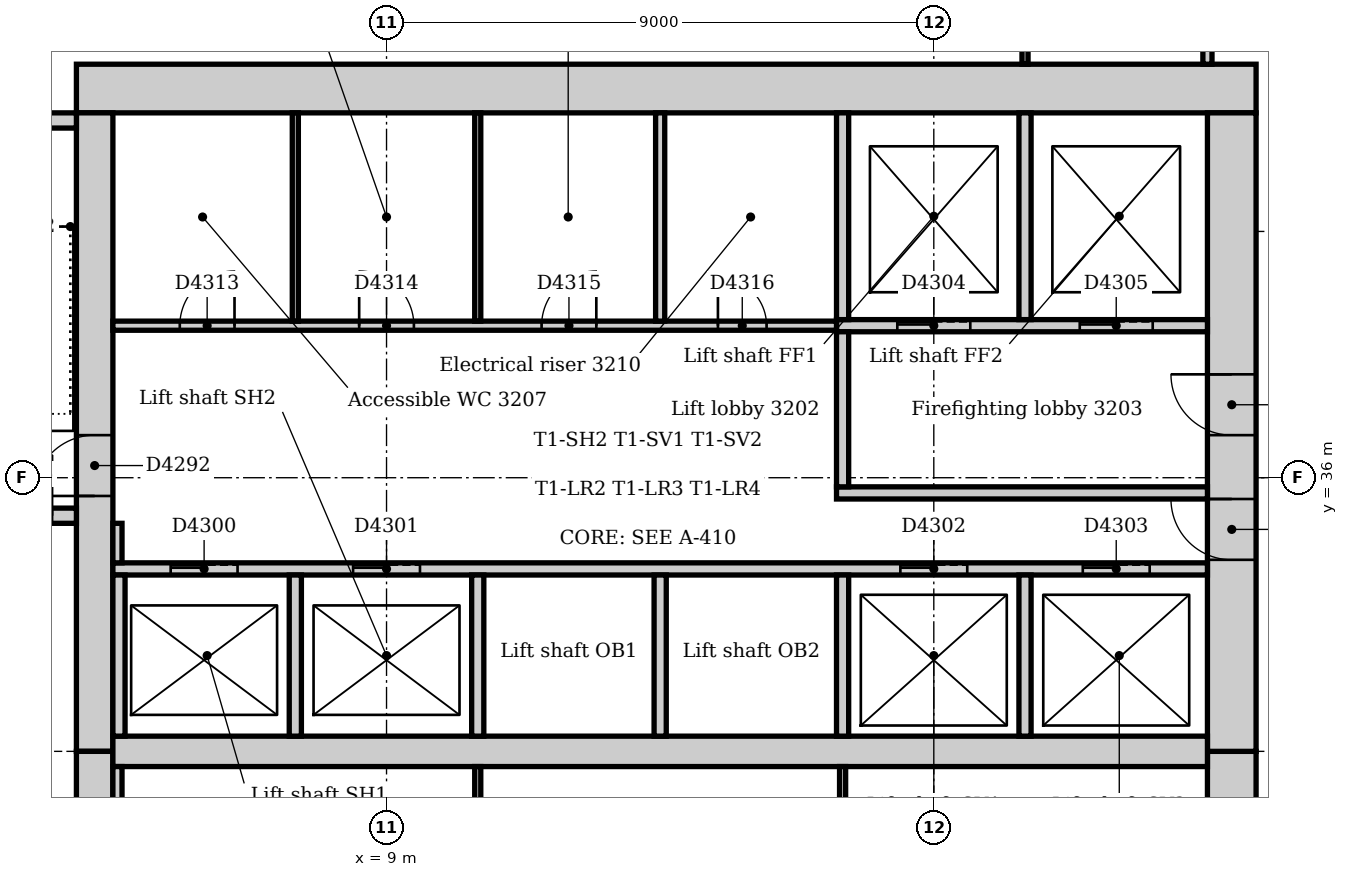
"""IFC4 building model, lengths in metres.
Left out: names, types, materials, properties, quantities, classifications, styles, units other than length and angle.
Written with IfcOpenShell. Run it as: python <this file> out.ifc"""

import sys

from ifc_helpers import new_model, si_unit, direction, frame, frame_2d, origin, place, context, subcontext, project, spatial, rectangle, extrude, element, fill, save


model = new_model("IFC4")
c1 = context("Model", 3, precision=1e-05, world=origin(), true_north=direction((0.0, 1.0)))
c2 = subcontext(c1, "Body", "Model", "MODEL_VIEW")
j1 = project(units=[si_unit("LENGTHUNIT", "METRE"), si_unit("PLANEANGLEUNIT", "RADIAN")], contexts=[c1])
p1 = place(None, origin())
s1 = spatial("IfcSite", under=j1, at=p1, CompositionType="ELEMENT")
p2 = place(p1, origin())
s2 = spatial("IfcBuilding", under=s1, at=p2, CompositionType="ELEMENT")
p3 = place(p2, frame((0.0, 0.0, 136.0)))
s3 = spatial("IfcBuildingStorey", under=s2, at=p3, CompositionType="ELEMENT", Elevation=136.0)
p4 = place(p3, frame((23.3, 42.4, 0.0), z_axis=(0.0, 0.0, 1.0), x_axis=(-1.0, 0.0, 0.0)))
e1 = element("IfcWall", 1, at=p4, inside=s3, PredefinedType="SOLIDWALL", context=c2, shape_type="SweptSolid", body=[
    extrude(rectangle(XDim=19.4, YDim=0.8, at=frame_2d((9.7, 0.0))), origin(), (0.0, 0.0, 1.0), 4.0),
])
p5 = place(p3, frame((22.9, 21.0, 0.0), z_axis=(0.0, 0.0, 1.0), x_axis=(0.0, 1.0, 0.0)))
e2 = element("IfcWall", 2, at=p5, inside=s3, PredefinedType="SOLIDWALL", context=c2, shape_type="SweptSolid", body=[
    extrude(rectangle(XDim=10.5, YDim=0.8, at=frame_2d((5.25, 0.0))), origin(), (0.0, 0.0, 1.0), 4.0),
])
p6 = place(p5, frame((4.35, 0.0, 0.0)))
e3 = element("IfcOpeningElement", 3, at=p6, cuts=e2, PredefinedType="OPENING", context=c2, shape_type="SweptSolid", body=[
    extrude(rectangle(XDim=1.8, YDim=2.1, at=frame_2d((0.9, 1.05))), frame((0.0, 0.41, 0.0), z_axis=(0.0, -1.0, 0.0), x_axis=(1.0, 0.0, 0.0)), (0.0, 0.0, 1.0), 0.82),
])
p7 = place(p3, frame((22.9, 31.5, 0.0), z_axis=(0.0, 0.0, 1.0), x_axis=(0.0, 1.0, 0.0)))
e4 = element("IfcWall", 4, at=p7, inside=s3, PredefinedType="SOLIDWALL", context=c2, shape_type="SweptSolid", body=[
    extrude(rectangle(XDim=10.5, YDim=0.8, at=frame_2d((5.25, 0.0))), origin(), (0.0, 0.0, 1.0), 4.0),
])
p8 = place(p7, frame((3.15, 0.0, 0.0)))
e5 = element("IfcOpeningElement", 5, at=p8, cuts=e4, PredefinedType="OPENING", context=c2, shape_type="SweptSolid", body=[
    extrude(rectangle(XDim=1.0, YDim=2.1, at=frame_2d((0.5, 1.05))), frame((0.0, 0.41, 0.0), z_axis=(0.0, -1.0, 0.0), x_axis=(1.0, 0.0, 0.0)), (0.0, 0.0, 1.0), 0.82),
])
p9 = place(p7, frame((5.2, 0.0, 0.0)))
e6 = element("IfcOpeningElement", 6, at=p9, cuts=e4, PredefinedType="OPENING", context=c2, shape_type="SweptSolid", body=[
    extrude(rectangle(XDim=1.0, YDim=2.1, at=frame_2d((0.5, 1.05))), frame((0.0, 0.41, 0.0), z_axis=(0.0, -1.0, 0.0), x_axis=(1.0, 0.0, 0.0)), (0.0, 0.0, 1.0), 0.82),
])
p10 = place(p3, frame((4.2, 42.0, 0.0), z_axis=(0.0, 0.0, 1.0), x_axis=(0.0, -1.0, 0.0)))
e7 = element("IfcWall", 7, at=p10, inside=s3, PredefinedType="SOLIDWALL", context=c2, shape_type="SweptSolid", body=[
    extrude(rectangle(XDim=10.5, YDim=0.6, at=frame_2d((5.25, 0.0))), origin(), (0.0, 0.0, 1.0), 4.0),
])
p11 = place(p10, frame((5.3, 0.0, 0.0)))
e8 = element("IfcOpeningElement", 8, at=p11, cuts=e7, PredefinedType="OPENING", context=c2, shape_type="SweptSolid", body=[
    extrude(rectangle(XDim=1.0, YDim=2.1, at=frame_2d((0.5, 1.05))), frame((0.0, 0.31, 0.0), z_axis=(0.0, -1.0, 0.0), x_axis=(1.0, 0.0, 0.0)), (0.0, 0.0, 1.0), 0.62),
])
p12 = place(p3, frame((4.2, 31.5, 0.0), z_axis=(0.0, 0.0, 1.0), x_axis=(0.0, -1.0, 0.0)))
e9 = element("IfcWall", 9, at=p12, inside=s3, PredefinedType="SOLIDWALL", context=c2, shape_type="SweptSolid", body=[
    extrude(rectangle(XDim=10.5, YDim=0.6, at=frame_2d((5.25, 0.0))), origin(), (0.0, 0.0, 1.0), 4.0),
])
p13 = place(p12, frame((4.25, 0.0, 0.0)))
e10 = element("IfcOpeningElement", 10, at=p13, cuts=e9, PredefinedType="OPENING", context=c2, shape_type="SweptSolid", body=[
    extrude(rectangle(XDim=1.0, YDim=2.1, at=frame_2d((0.5, 1.05))), frame((0.0, 0.31, 0.0), z_axis=(0.0, -1.0, 0.0), x_axis=(1.0, 0.0, 0.0)), (0.0, 0.0, 1.0), 0.62),
])
p14 = place(p3, frame((4.5, 31.5, 0.0), z_axis=(0.0, 0.0, 1.0), x_axis=(1.0, 0.0, 0.0)))
e11 = element("IfcWall", 11, at=p14, inside=s3, PredefinedType="SOLIDWALL", context=c2, shape_type="SweptSolid", body=[
    extrude(rectangle(XDim=18.0, YDim=0.5, at=frame_2d((9.0, 0.0))), origin(), (0.0, 0.0, 1.0), 4.0),
])
p15 = place(p3, frame((0.36, 35.375, 0.0), z_axis=(0.0, 0.0, 1.0), x_axis=(1.0, 0.0, 0.0)))
e12 = element("IfcWall", 12, at=p15, inside=s3, PredefinedType="SOLIDWALL", context=c2, shape_type="SweptSolid", body=[
    extrude(rectangle(XDim=3.54, YDim=0.25, at=frame_2d((1.77, 0.0))), origin(), (0.0, 0.0, 1.0), 4.0),
])
p16 = place(p15, frame((2.14, 0.0, 0.0)))
e13 = element("IfcOpeningElement", 13, at=p16, cuts=e12, PredefinedType="OPENING", context=c2, shape_type="SweptSolid", body=[
    extrude(rectangle(XDim=1.0, YDim=2.1, at=frame_2d((0.5, 1.05))), frame((0.0, 0.135, 0.0), z_axis=(0.0, -1.0, 0.0), x_axis=(1.0, 0.0, 0.0)), (0.0, 0.0, 1.0), 0.27),
])
p17 = place(p3, frame((3.9, 41.875, 0.0), z_axis=(0.0, 0.0, 1.0), x_axis=(-1.0, 0.0, 0.0)))
e14 = element("IfcWall", 14, at=p17, inside=s3, PredefinedType="SOLIDWALL", context=c2, shape_type="SweptSolid", body=[
    extrude(rectangle(XDim=3.54, YDim=0.25, at=frame_2d((1.77, 0.0))), origin(), (0.0, 0.0, 1.0), 4.0),
])
p18 = place(p3, frame((16.4, 35.75, 0.0), z_axis=(0.0, 0.0, 1.0), x_axis=(1.0, 0.0, 0.0)))
e15 = element("IfcWall", 15, at=p18, inside=s3, PredefinedType="PARTITIONING", context=c2, shape_type="SweptSolid", body=[
    extrude(rectangle(XDim=6.1, YDim=0.2, at=frame_2d((3.05, 0.0))), origin(), (0.0, 0.0, 1.0), 3.85),
])
p19 = place(p3, frame((16.4, 38.5, 0.0), z_axis=(0.0, 0.0, 1.0), x_axis=(1.0, 0.0, 0.0)))
e16 = element("IfcWall", 16, at=p19, inside=s3, PredefinedType="PARTITIONING", context=c2, shape_type="SweptSolid", body=[
    extrude(rectangle(XDim=6.1, YDim=0.2, at=frame_2d((3.05, 0.0))), origin(), (0.0, 0.0, 1.0), 3.85),
])
p20 = place(p19, frame((1.0, 0.0, 0.0)))
e17 = element("IfcOpeningElement", 17, at=p20, cuts=e16, PredefinedType="OPENING", context=c2, shape_type="SweptSolid", body=[
    extrude(rectangle(XDim=1.2, YDim=2.1, at=frame_2d((0.6, 1.05))), frame((0.0, 0.11, 0.0), z_axis=(0.0, -1.0, 0.0), x_axis=(1.0, 0.0, 0.0)), (0.0, 0.0, 1.0), 0.22),
])
p21 = place(p19, frame((4.0, 0.0, 0.0)))
e18 = element("IfcOpeningElement", 18, at=p21, cuts=e16, PredefinedType="OPENING", context=c2, shape_type="SweptSolid", body=[
    extrude(rectangle(XDim=1.2, YDim=2.1, at=frame_2d((0.6, 1.05))), frame((0.0, 0.11, 0.0), z_axis=(0.0, -1.0, 0.0), x_axis=(1.0, 0.0, 0.0)), (0.0, 0.0, 1.0), 0.22),
])
p22 = place(p3, frame((16.5, 35.85, 0.0), z_axis=(0.0, 0.0, 1.0), x_axis=(0.0, 1.0, 0.0)))
e19 = element("IfcWall", 19, at=p22, inside=s3, PredefinedType="PARTITIONING", context=c2, shape_type="SweptSolid", body=[
    extrude(rectangle(XDim=2.55, YDim=0.2, at=frame_2d((1.275, 0.0))), origin(), (0.0, 0.0, 1.0), 3.85),
])
p23 = place(p3, frame((4.5, 34.5, 0.0), z_axis=(0.0, 0.0, 1.0), x_axis=(1.0, 0.0, 0.0)))
e20 = element("IfcWall", 20, at=p23, inside=s3, PredefinedType="PARTITIONING", context=c2, shape_type="SweptSolid", body=[
    extrude(rectangle(XDim=18.0, YDim=0.2, at=frame_2d((9.0, 0.0))), origin(), (0.0, 0.0, 1.0), 3.85),
])
p24 = place(p23, frame((0.95, 0.0, 0.0)))
e21 = element("IfcOpeningElement", 21, at=p24, cuts=e20, PredefinedType="OPENING", context=c2, shape_type="SweptSolid", body=[
    extrude(rectangle(XDim=1.1, YDim=2.1, at=frame_2d((0.55, 1.05))), frame((0.0, 0.11, 0.0), z_axis=(0.0, -1.0, 0.0), x_axis=(1.0, 0.0, 0.0)), (0.0, 0.0, 1.0), 0.22),
])
p25 = place(p23, frame((3.95, 0.0, 0.0)))
e22 = element("IfcOpeningElement", 22, at=p25, cuts=e20, PredefinedType="OPENING", context=c2, shape_type="SweptSolid", body=[
    extrude(rectangle(XDim=1.1, YDim=2.1, at=frame_2d((0.55, 1.05))), frame((0.0, 0.11, 0.0), z_axis=(0.0, -1.0, 0.0), x_axis=(1.0, 0.0, 0.0)), (0.0, 0.0, 1.0), 0.22),
])
p26 = place(p23, frame((12.95, 0.0, 0.0)))
e23 = element("IfcOpeningElement", 23, at=p26, cuts=e20, PredefinedType="OPENING", context=c2, shape_type="SweptSolid", body=[
    extrude(rectangle(XDim=1.1, YDim=2.1, at=frame_2d((0.55, 1.05))), frame((0.0, 0.11, 0.0), z_axis=(0.0, -1.0, 0.0), x_axis=(1.0, 0.0, 0.0)), (0.0, 0.0, 1.0), 0.22),
])
p27 = place(p23, frame((15.95, 0.0, 0.0)))
e24 = element("IfcOpeningElement", 24, at=p27, cuts=e20, PredefinedType="OPENING", context=c2, shape_type="SweptSolid", body=[
    extrude(rectangle(XDim=1.1, YDim=2.1, at=frame_2d((0.55, 1.05))), frame((0.0, 0.11, 0.0), z_axis=(0.0, -1.0, 0.0), x_axis=(1.0, 0.0, 0.0)), (0.0, 0.0, 1.0), 0.22),
])
for number, where, z_axis, x_axis in (
    (25, (16.5, 38.6, 0.0), (0.0, 0.0, 1.0), (0.0, 1.0, 0.0)),
    (26, (19.5, 38.6, 0.0), (0.0, 0.0, 1.0), (0.0, 1.0, 0.0)),
):
    element("IfcWall", number, at=place(p3, frame(where, z_axis=z_axis, x_axis=x_axis)), inside=s3, PredefinedType="PARTITIONING", context=c2, shape_type="SweptSolid", body=[
        extrude(rectangle(XDim=3.4, YDim=0.2, at=frame_2d((1.7, 0.0))), origin(), (0.0, 0.0, 1.0), 3.85),
    ])
for number, where, z_axis, x_axis in (
    (27, (4.6, 31.75, 0.0), (0.0, 0.0, 1.0), (0.0, 1.0, 0.0)),
    (28, (7.5, 31.75, 0.0), (0.0, 0.0, 1.0), (0.0, 1.0, 0.0)),
    (29, (10.5, 31.75, 0.0), (0.0, 0.0, 1.0), (0.0, 1.0, 0.0)),
    (30, (13.5, 31.75, 0.0), (0.0, 0.0, 1.0), (0.0, 1.0, 0.0)),
    (31, (16.5, 31.75, 0.0), (0.0, 0.0, 1.0), (0.0, 1.0, 0.0)),
    (32, (19.5, 31.75, 0.0), (0.0, 0.0, 1.0), (0.0, 1.0, 0.0)),
):
    element("IfcWall", number, at=place(p3, frame(where, z_axis=z_axis, x_axis=x_axis)), inside=s3, PredefinedType="PARTITIONING", context=c2, shape_type="SweptSolid", body=[
        extrude(rectangle(XDim=2.65, YDim=0.2, at=frame_2d((1.325, 0.0))), origin(), (0.0, 0.0, 1.0), 3.85),
    ])
p28 = place(p3, frame((4.5, 38.5, 0.0), z_axis=(0.0, 0.0, 1.0), x_axis=(1.0, 0.0, 0.0)))
e33 = element("IfcWall", 33, at=p28, inside=s3, PredefinedType="PARTITIONING", context=c2, shape_type="SweptSolid", body=[
    extrude(rectangle(XDim=11.9, YDim=0.15, at=frame_2d((5.95, 0.0))), origin(), (0.0, 0.0, 1.0), 3.85),
])
p29 = place(p28, frame((1.1, 0.0, 0.0)))
e34 = element("IfcOpeningElement", 34, at=p29, cuts=e33, PredefinedType="OPENING", context=c2, shape_type="SweptSolid", body=[
    extrude(rectangle(XDim=0.9, YDim=2.1, at=frame_2d((0.45, 1.05))), frame((0.0, 0.085, 0.0), z_axis=(0.0, -1.0, 0.0), x_axis=(1.0, 0.0, 0.0)), (0.0, 0.0, 1.0), 0.17),
])
p30 = place(p28, frame((4.05, 0.0, 0.0)))
e35 = element("IfcOpeningElement", 35, at=p30, cuts=e33, PredefinedType="OPENING", context=c2, shape_type="SweptSolid", body=[
    extrude(rectangle(XDim=0.9, YDim=2.1, at=frame_2d((0.45, 1.05))), frame((0.0, 0.085, 0.0), z_axis=(0.0, -1.0, 0.0), x_axis=(1.0, 0.0, 0.0)), (0.0, 0.0, 1.0), 0.17),
])
p31 = place(p28, frame((7.05, 0.0, 0.0)))
e36 = element("IfcOpeningElement", 36, at=p31, cuts=e33, PredefinedType="OPENING", context=c2, shape_type="SweptSolid", body=[
    extrude(rectangle(XDim=0.9, YDim=2.1, at=frame_2d((0.45, 1.05))), frame((0.0, 0.085, 0.0), z_axis=(0.0, -1.0, 0.0), x_axis=(1.0, 0.0, 0.0)), (0.0, 0.0, 1.0), 0.17),
])
p32 = place(p28, frame((9.95, 0.0, 0.0)))
e37 = element("IfcOpeningElement", 37, at=p32, cuts=e33, PredefinedType="OPENING", context=c2, shape_type="SweptSolid", body=[
    extrude(rectangle(XDim=0.8, YDim=2.1, at=frame_2d((0.4, 1.05))), frame((0.0, 0.085, 0.0), z_axis=(0.0, -1.0, 0.0), x_axis=(1.0, 0.0, 0.0)), (0.0, 0.0, 1.0), 0.17),
])
p33 = place(p3, frame((22.5, 42.8, 0.0), z_axis=(0.0, 0.0, 1.0), x_axis=(0.0, 1.0, 0.0)))
e38 = element("IfcWall", 38, at=p33, inside=s3, PredefinedType="PARTITIONING", context=c2, shape_type="SweptSolid", body=[
    extrude(rectangle(XDim=6.34, YDim=0.15, at=frame_2d((3.17, 0.0))), origin(), (0.0, 0.0, 1.0), 3.85),
])
p34 = place(p33, frame((3.7, 0.0, 0.0)))
e39 = element("IfcOpeningElement", 39, at=p34, cuts=e38, PredefinedType="OPENING", context=c2, shape_type="SweptSolid", body=[
    extrude(rectangle(XDim=1.0, YDim=2.1, at=frame_2d((0.5, 1.05))), frame((0.0, 0.085, 0.0), z_axis=(0.0, -1.0, 0.0), x_axis=(1.0, 0.0, 0.0)), (0.0, 0.0, 1.0), 0.17),
])
p35 = place(p3, frame((4.575, 28.575, 0.0), z_axis=(0.0, 0.0, 1.0), x_axis=(0.0, 1.0, 0.0)))
e40 = element("IfcWall", 40, at=p35, inside=s3, PredefinedType="PARTITIONING", context=c2, shape_type="SweptSolid", body=[
    extrude(rectangle(XDim=2.675, YDim=0.15, at=frame_2d((1.337, 0.0))), origin(), (0.0, 0.0, 1.0), 3.85),
])
p36 = place(p3, frame((4.575, 34.6, 0.0), z_axis=(0.0, 0.0, 1.0), x_axis=(0.0, 1.0, 0.0)))
e41 = element("IfcWall", 41, at=p36, inside=s3, PredefinedType="PARTITIONING", context=c2, shape_type="SweptSolid", body=[
    extrude(rectangle(XDim=0.65, YDim=0.15, at=frame_2d((0.325, 0.0))), origin(), (0.0, 0.0, 1.0), 3.85),
])
p37 = place(p3, frame((13.5, 38.575, 0.0), z_axis=(0.0, 0.0, 1.0), x_axis=(0.0, 1.0, 0.0)))
e42 = element("IfcWall", 42, at=p37, inside=s3, PredefinedType="PARTITIONING", context=c2, shape_type="SweptSolid", body=[
    extrude(rectangle(XDim=3.425, YDim=0.15, at=frame_2d((1.712, 0.0))), origin(), (0.0, 0.0, 1.0), 3.85),
])
p38 = place(p3, frame((19.5, 42.8, 0.0), z_axis=(0.0, 0.0, 1.0), x_axis=(0.0, 1.0, 0.0)))
e43 = element("IfcWall", 43, at=p38, inside=s3, PredefinedType="PARTITIONING", context=c2, shape_type="SweptSolid", body=[
    extrude(rectangle(XDim=6.34, YDim=0.1, at=frame_2d((3.17, 0.0))), origin(), (0.0, 0.0, 1.0), 3.85),
])
p39 = place(p38, frame((2.7, 0.0, 0.0)))
e44 = element("IfcOpeningElement", 44, at=p39, cuts=e43, PredefinedType="OPENING", context=c2, shape_type="SweptSolid", body=[
    extrude(rectangle(XDim=0.9, YDim=2.1, at=frame_2d((0.45, 1.05))), frame((0.0, 0.06, 0.0), z_axis=(0.0, -1.0, 0.0), x_axis=(1.0, 0.0, 0.0)), (0.0, 0.0, 1.0), 0.12),
])
for number, where, z_axis, x_axis in (
    (45, (7.5, 38.575, 0.0), (0.0, 0.0, 1.0), (0.0, 1.0, 0.0)),
    (46, (10.5, 38.575, 0.0), (0.0, 0.0, 1.0), (0.0, 1.0, 0.0)),
):
    element("IfcWall", number, at=place(p3, frame(where, z_axis=z_axis, x_axis=x_axis)), inside=s3, PredefinedType="PARTITIONING", context=c2, shape_type="SweptSolid", body=[
        extrude(rectangle(XDim=3.425, YDim=0.1, at=frame_2d((1.712, 0.0))), origin(), (0.0, 0.0, 1.0), 3.85),
    ])
for number, where, z_axis, x_axis in (
    (47, (10.5, 28.575, 0.0), (0.0, 0.0, 1.0), (0.0, 1.0, 0.0)),
    (48, (16.5, 28.575, 0.0), (0.0, 0.0, 1.0), (0.0, 1.0, 0.0)),
):
    element("IfcWall", number, at=place(p3, frame(where, z_axis=z_axis, x_axis=x_axis)), inside=s3, PredefinedType="PARTITIONING", context=c2, shape_type="SweptSolid", body=[
        extrude(rectangle(XDim=2.675, YDim=0.1, at=frame_2d((1.337, 0.0))), origin(), (0.0, 0.0, 1.0), 3.85),
    ])
p40 = place(p11, frame((1.0, 0.0, 0.0), z_axis=(0.0, 0.0, 1.0), x_axis=(-1.0, 0.0, 0.0)))
e49 = element("IfcDoor", 49, at=p40, inside=s3, OperationType="SINGLE_SWING_LEFT", PredefinedType="DOOR", context=c2, shape_type="SweptSolid", body=[
    extrude(rectangle(XDim=1.0, YDim=2.1, at=frame_2d((0.5, 1.05))), frame((0.0, 0.025, 0.0), z_axis=(0.0, -1.0, 0.0), x_axis=(1.0, 0.0, 0.0)), (0.0, 0.0, 1.0), 0.05),
])
fill(e8, e49)
p41 = place(p24, origin())
e50 = element("IfcDoor", 50, at=p41, inside=s3, OperationType="SLIDING_TO_LEFT", PredefinedType="DOOR", context=c2, shape_type="SweptSolid", body=[
    extrude(rectangle(XDim=1.1, YDim=2.1, at=frame_2d((0.55, 1.05))), frame((0.0, 0.025, 0.0), z_axis=(0.0, -1.0, 0.0), x_axis=(1.0, 0.0, 0.0)), (0.0, 0.0, 1.0), 0.05),
])
fill(e21, e50)
p42 = place(p25, origin())
e51 = element("IfcDoor", 51, at=p42, inside=s3, OperationType="SLIDING_TO_LEFT", PredefinedType="DOOR", context=c2, shape_type="SweptSolid", body=[
    extrude(rectangle(XDim=1.1, YDim=2.1, at=frame_2d((0.55, 1.05))), frame((0.0, 0.025, 0.0), z_axis=(0.0, -1.0, 0.0), x_axis=(1.0, 0.0, 0.0)), (0.0, 0.0, 1.0), 0.05),
])
fill(e22, e51)
p43 = place(p26, origin())
e52 = element("IfcDoor", 52, at=p43, inside=s3, OperationType="SLIDING_TO_LEFT", PredefinedType="DOOR", context=c2, shape_type="SweptSolid", body=[
    extrude(rectangle(XDim=1.1, YDim=2.1, at=frame_2d((0.55, 1.05))), frame((0.0, 0.025, 0.0), z_axis=(0.0, -1.0, 0.0), x_axis=(1.0, 0.0, 0.0)), (0.0, 0.0, 1.0), 0.05),
])
fill(e23, e52)
p44 = place(p27, origin())
e53 = element("IfcDoor", 53, at=p44, inside=s3, OperationType="SLIDING_TO_LEFT", PredefinedType="DOOR", context=c2, shape_type="SweptSolid", body=[
    extrude(rectangle(XDim=1.1, YDim=2.1, at=frame_2d((0.55, 1.05))), frame((0.0, 0.025, 0.0), z_axis=(0.0, -1.0, 0.0), x_axis=(1.0, 0.0, 0.0)), (0.0, 0.0, 1.0), 0.05),
])
fill(e24, e53)
p45 = place(p20, origin())
e54 = element("IfcDoor", 54, at=p45, inside=s3, OperationType="SLIDING_TO_LEFT", PredefinedType="DOOR", context=c2, shape_type="SweptSolid", body=[
    extrude(rectangle(XDim=1.2, YDim=2.1, at=frame_2d((0.6, 1.05))), frame((0.0, 0.025, 0.0), z_axis=(0.0, -1.0, 0.0), x_axis=(1.0, 0.0, 0.0)), (0.0, 0.0, 1.0), 0.05),
])
fill(e17, e54)
p46 = place(p21, origin())
e55 = element("IfcDoor", 55, at=p46, inside=s3, OperationType="SLIDING_TO_LEFT", PredefinedType="DOOR", context=c2, shape_type="SweptSolid", body=[
    extrude(rectangle(XDim=1.2, YDim=2.1, at=frame_2d((0.6, 1.05))), frame((0.0, 0.025, 0.0), z_axis=(0.0, -1.0, 0.0), x_axis=(1.0, 0.0, 0.0)), (0.0, 0.0, 1.0), 0.05),
])
fill(e18, e55)
p47 = place(p8, origin())
e56 = element("IfcDoor", 56, at=p47, inside=s3, OperationType="SINGLE_SWING_RIGHT", PredefinedType="DOOR", context=c2, shape_type="SweptSolid", body=[
    extrude(rectangle(XDim=1.0, YDim=2.1, at=frame_2d((0.5, 1.05))), frame((0.0, 0.025, 0.0), z_axis=(0.0, -1.0, 0.0), x_axis=(1.0, 0.0, 0.0)), (0.0, 0.0, 1.0), 0.05),
])
fill(e5, e56)
p48 = place(p9, origin())
e57 = element("IfcDoor", 57, at=p48, inside=s3, OperationType="SINGLE_SWING_RIGHT", PredefinedType="DOOR", context=c2, shape_type="SweptSolid", body=[
    extrude(rectangle(XDim=1.0, YDim=2.1, at=frame_2d((0.5, 1.05))), frame((0.0, 0.025, 0.0), z_axis=(0.0, -1.0, 0.0), x_axis=(1.0, 0.0, 0.0)), (0.0, 0.0, 1.0), 0.05),
])
fill(e6, e57)
p49 = place(p29, origin())
e58 = element("IfcDoor", 58, at=p49, inside=s3, OperationType="SINGLE_SWING_RIGHT", PredefinedType="DOOR", context=c2, shape_type="SweptSolid", body=[
    extrude(rectangle(XDim=0.9, YDim=2.1, at=frame_2d((0.45, 1.05))), frame((0.0, 0.025, 0.0), z_axis=(0.0, -1.0, 0.0), x_axis=(1.0, 0.0, 0.0)), (0.0, 0.0, 1.0), 0.05),
])
fill(e34, e58)
p50 = place(p30, origin())
e59 = element("IfcDoor", 59, at=p50, inside=s3, OperationType="SINGLE_SWING_LEFT", PredefinedType="DOOR", context=c2, shape_type="SweptSolid", body=[
    extrude(rectangle(XDim=0.9, YDim=2.1, at=frame_2d((0.45, 1.05))), frame((0.0, 0.025, 0.0), z_axis=(0.0, -1.0, 0.0), x_axis=(1.0, 0.0, 0.0)), (0.0, 0.0, 1.0), 0.05),
])
fill(e35, e59)
p51 = place(p31, origin())
e60 = element("IfcDoor", 60, at=p51, inside=s3, OperationType="SINGLE_SWING_RIGHT", PredefinedType="DOOR", context=c2, shape_type="SweptSolid", body=[
    extrude(rectangle(XDim=0.9, YDim=2.1, at=frame_2d((0.45, 1.05))), frame((0.0, 0.025, 0.0), z_axis=(0.0, -1.0, 0.0), x_axis=(1.0, 0.0, 0.0)), (0.0, 0.0, 1.0), 0.05),
])
fill(e36, e60)
p52 = place(p32, origin())
e61 = element("IfcDoor", 61, at=p52, inside=s3, OperationType="SINGLE_SWING_LEFT", PredefinedType="DOOR", context=c2, shape_type="SweptSolid", body=[
    extrude(rectangle(XDim=0.8, YDim=2.1, at=frame_2d((0.4, 1.05))), frame((0.0, 0.025, 0.0), z_axis=(0.0, -1.0, 0.0), x_axis=(1.0, 0.0, 0.0)), (0.0, 0.0, 1.0), 0.05),
])
fill(e37, e61)
save(model, sys.argv[1])
